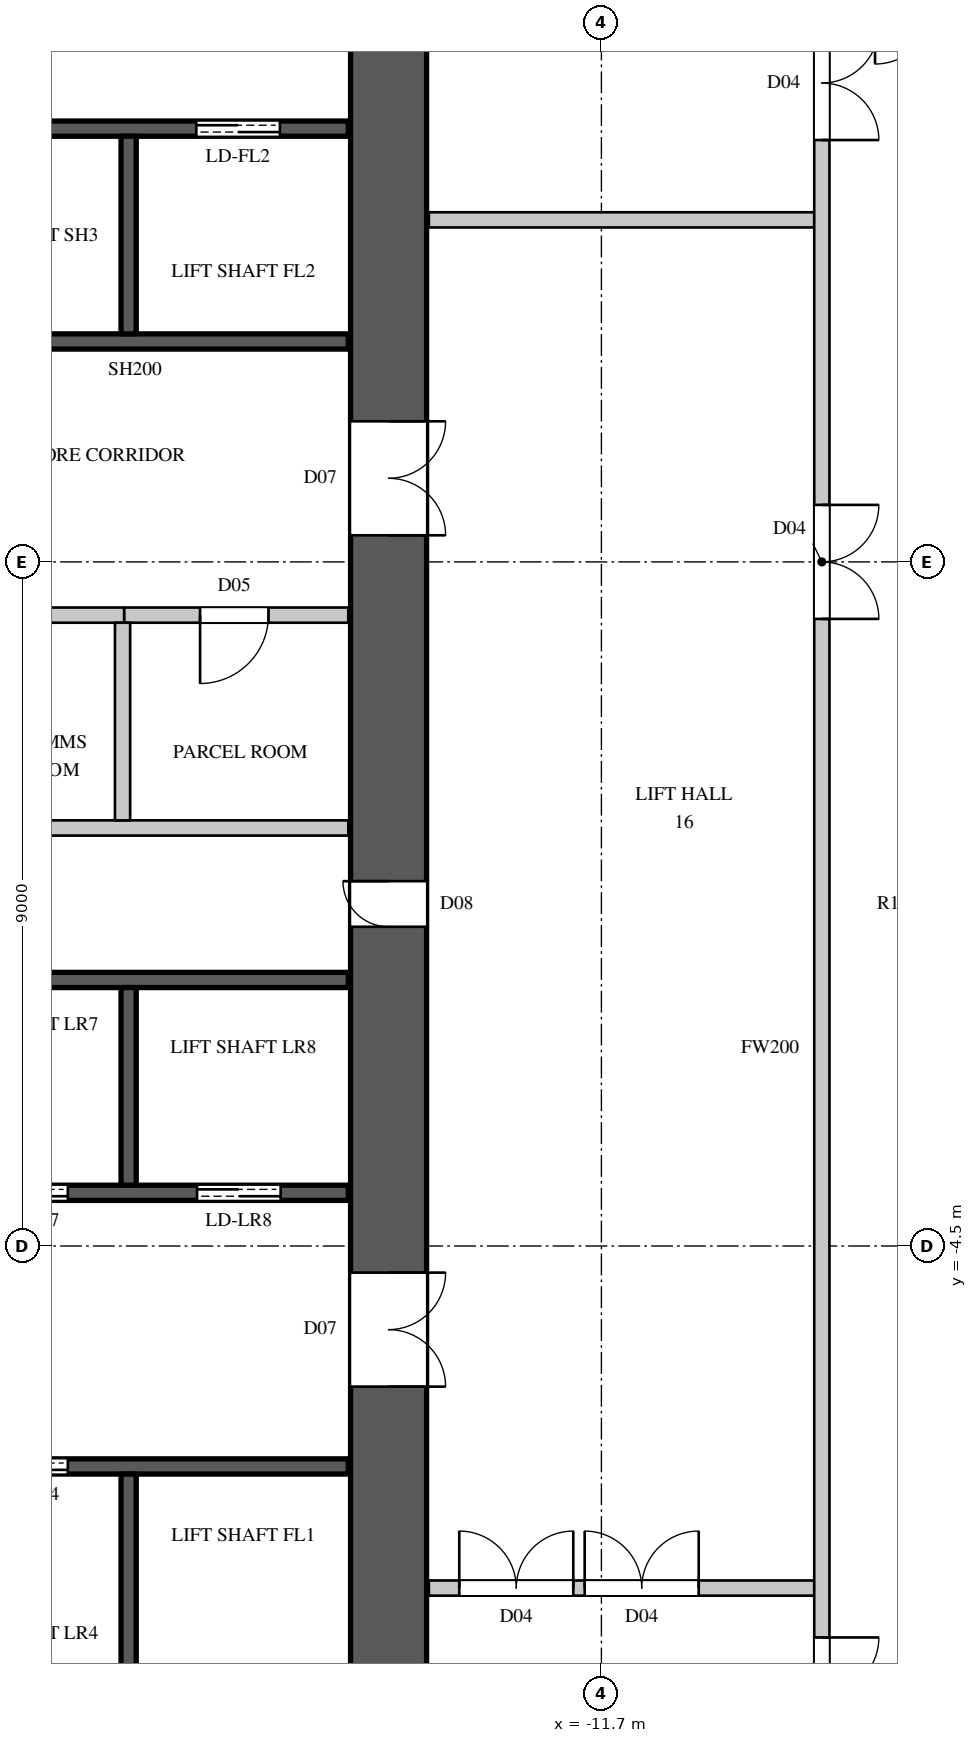
"""IFC4 building model, lengths in metres.
Left out: names, types, materials, properties, quantities, classifications, styles, units other than length and angle.
Written with IfcOpenShell. Run it as: python <this file> out.ifc"""

import sys

from ifc_helpers import new_model, si_unit, direction, frame, frame_2d, origin, place, context, subcontext, project, spatial, rectangle, extrude, element, fill, save


model = new_model("IFC4")
c1 = context("Model", 3, precision=1e-05, world=origin(), true_north=direction((0.0, 1.0)))
c2 = subcontext(c1, "Body", "Model", "MODEL_VIEW")
j1 = project(units=[si_unit("LENGTHUNIT", "METRE"), si_unit("PLANEANGLEUNIT", "RADIAN")], contexts=[c1])
p1 = place(None, origin())
s1 = spatial("IfcSite", under=j1, at=p1, CompositionType="ELEMENT")
p2 = place(p1, origin())
s2 = spatial("IfcBuilding", under=s1, at=p2, CompositionType="ELEMENT")
p3 = place(p2, frame((0.0, 0.0, 87.9)))
s3 = spatial("IfcBuildingStorey", under=s2, at=p3, CompositionType="ELEMENT", Elevation=87.9)
p4 = place(p3, frame((-14.5, -14.8, 0.0), z_axis=(0.0, 0.0, 1.0), x_axis=(0.0, 1.0, 0.0)))
e1 = element("IfcWall", 1, at=p4, inside=s3, PredefinedType="SHEAR", context=c2, shape_type="SweptSolid", body=[
    extrude(rectangle(XDim=29.6, YDim=1.0, at=frame_2d((14.8, 0.0))), origin(), (0.0, 0.0, 1.0), 3.6),
])
p5 = place(p4, frame((8.45, 0.0, 0.0)))
e2 = element("IfcOpeningElement", 2, at=p5, cuts=e1, PredefinedType="OPENING", context=c2, shape_type="SweptSolid", body=[
    extrude(rectangle(XDim=1.5, YDim=2.4, at=frame_2d((0.75, 1.2))), frame((0.0, 0.51, 0.0), z_axis=(0.0, -1.0, 0.0), x_axis=(1.0, 0.0, 0.0)), (0.0, 0.0, 1.0), 1.02),
])
p6 = place(p4, frame((19.65, 0.0, 0.0)))
e3 = element("IfcOpeningElement", 3, at=p6, cuts=e1, PredefinedType="OPENING", context=c2, shape_type="SweptSolid", body=[
    extrude(rectangle(XDim=1.5, YDim=2.4, at=frame_2d((0.75, 1.2))), frame((0.0, 0.51, 0.0), z_axis=(0.0, -1.0, 0.0), x_axis=(1.0, 0.0, 0.0)), (0.0, 0.0, 1.0), 1.02),
])
p7 = place(p4, frame((14.5, 0.0, 0.0)))
e4 = element("IfcOpeningElement", 4, at=p7, cuts=e1, PredefinedType="OPENING", context=c2, shape_type="SweptSolid", body=[
    extrude(rectangle(XDim=0.6, YDim=2.0, at=frame_2d((0.3, 1.0))), frame((0.0, 0.51, 0.0), z_axis=(0.0, -1.0, 0.0), x_axis=(1.0, 0.0, 0.0)), (0.0, 0.0, 1.0), 1.02),
])
p8 = place(p3, frame((-17.98, 3.8, 0.0), z_axis=(0.0, 0.0, 1.0), x_axis=(1.0, 0.0, 0.0)))
e5 = element("IfcWall", 5, at=p8, inside=s3, PredefinedType="PARTITIONING", context=c2, shape_type="SweptSolid", body=[
    extrude(rectangle(XDim=2.95, YDim=0.2, at=frame_2d((1.475, 0.0))), origin(), (0.0, 0.0, 1.0), 3.3),
])
p9 = place(p8, frame((1.0, 0.0, 0.0)))
e6 = element("IfcOpeningElement", 6, at=p9, cuts=e5, PredefinedType="OPENING", context=c2, shape_type="SweptSolid", body=[
    extrude(rectangle(XDim=0.9, YDim=2.2, at=frame_2d((0.45, 1.1))), frame((0.0, 0.11, 0.0), z_axis=(0.0, -1.0, 0.0), x_axis=(1.0, 0.0, 0.0)), (0.0, 0.0, 1.0), 0.22),
])
p10 = place(p3, frame((-13.97, -9.0, 0.0), z_axis=(0.0, 0.0, 1.0), x_axis=(1.0, 0.0, 0.0)))
e7 = element("IfcWall", 7, at=p10, inside=s3, PredefinedType="PARTITIONING", context=c2, shape_type="SweptSolid", body=[
    extrude(rectangle(XDim=5.07, YDim=0.2, at=frame_2d((2.535, 0.0))), origin(), (0.0, 0.0, 1.0), 3.3),
])
p11 = place(p10, frame((0.4, 0.0, 0.0)))
e8 = element("IfcOpeningElement", 8, at=p11, cuts=e7, PredefinedType="OPENING", context=c2, shape_type="SweptSolid", body=[
    extrude(rectangle(XDim=1.5, YDim=2.2, at=frame_2d((0.75, 1.1))), frame((0.0, 0.11, 0.0), z_axis=(0.0, -1.0, 0.0), x_axis=(1.0, 0.0, 0.0)), (0.0, 0.0, 1.0), 0.22),
])
p12 = place(p10, frame((2.05, 0.0, 0.0)))
e9 = element("IfcOpeningElement", 9, at=p12, cuts=e7, PredefinedType="OPENING", context=c2, shape_type="SweptSolid", body=[
    extrude(rectangle(XDim=1.5, YDim=2.2, at=frame_2d((0.75, 1.1))), frame((0.0, 0.11, 0.0), z_axis=(0.0, -1.0, 0.0), x_axis=(1.0, 0.0, 0.0)), (0.0, 0.0, 1.0), 0.22),
])
p13 = place(p3, frame((-13.97, 9.0, 0.0), z_axis=(0.0, 0.0, 1.0), x_axis=(1.0, 0.0, 0.0)))
e10 = element("IfcWall", 10, at=p13, inside=s3, PredefinedType="PARTITIONING", context=c2, shape_type="SweptSolid", body=[
    extrude(rectangle(XDim=5.07, YDim=0.2, at=frame_2d((2.535, 0.0))), origin(), (0.0, 0.0, 1.0), 3.3),
])
p14 = place(p3, frame((-8.8, -15.5, 0.0), z_axis=(0.0, 0.0, 1.0), x_axis=(0.0, 1.0, 0.0)))
e11 = element("IfcWall", 11, at=p14, inside=s3, PredefinedType="PARTITIONING", context=c2, shape_type="SweptSolid", body=[
    extrude(rectangle(XDim=27.2, YDim=0.2, at=frame_2d((13.6, 0.0))), origin(), (0.0, 0.0, 1.0), 3.3),
])
p15 = place(p14, frame((19.25, 0.0, 0.0)))
e12 = element("IfcOpeningElement", 12, at=p15, cuts=e11, PredefinedType="OPENING", context=c2, shape_type="SweptSolid", body=[
    extrude(rectangle(XDim=1.5, YDim=2.2, at=frame_2d((0.75, 1.1))), frame((0.0, 0.11, 0.0), z_axis=(0.0, -1.0, 0.0), x_axis=(1.0, 0.0, 0.0)), (0.0, 0.0, 1.0), 0.22),
])
p16 = place(p14, frame((4.35, 0.0, 0.0)))
e13 = element("IfcOpeningElement", 13, at=p16, cuts=e11, PredefinedType="OPENING", context=c2, shape_type="SweptSolid", body=[
    extrude(rectangle(XDim=1.5, YDim=2.2, at=frame_2d((0.75, 1.1))), frame((0.0, 0.11, 0.0), z_axis=(0.0, -1.0, 0.0), x_axis=(1.0, 0.0, 0.0)), (0.0, 0.0, 1.0), 0.22),
])
p17 = place(p14, frame((25.55, 0.0, 0.0)))
e14 = element("IfcOpeningElement", 14, at=p17, cuts=e11, PredefinedType="OPENING", context=c2, shape_type="SweptSolid", body=[
    extrude(rectangle(XDim=1.5, YDim=2.2, at=frame_2d((0.75, 1.1))), frame((0.0, 0.11, 0.0), z_axis=(0.0, -1.0, 0.0), x_axis=(1.0, 0.0, 0.0)), (0.0, 0.0, 1.0), 0.22),
])
p18 = place(p14, frame((0.15, 0.0, 0.0)))
e15 = element("IfcOpeningElement", 15, at=p18, cuts=e11, PredefinedType="OPENING", context=c2, shape_type="SweptSolid", body=[
    extrude(rectangle(XDim=0.9, YDim=2.2, at=frame_2d((0.45, 1.1))), frame((0.0, 0.11, 0.0), z_axis=(0.0, -1.0, 0.0), x_axis=(1.0, 0.0, 0.0)), (0.0, 0.0, 1.0), 0.22),
])
p19 = place(p3, frame((-26.1, 1.0, 0.0), z_axis=(0.0, 0.0, 1.0), x_axis=(1.0, 0.0, 0.0)))
e16 = element("IfcWall", 16, at=p19, inside=s3, PredefinedType="PARTITIONING", context=c2, shape_type="SweptSolid", body=[
    extrude(rectangle(XDim=11.07, YDim=0.2, at=frame_2d((5.535, 0.0))), origin(), (0.0, 0.0, 1.0), 3.3),
])
p20 = place(p3, frame((-21.78, 3.8, 0.0), z_axis=(0.0, 0.0, 1.0), x_axis=(1.0, 0.0, 0.0)))
e17 = element("IfcWall", 17, at=p20, inside=s3, PredefinedType="PARTITIONING", context=c2, shape_type="SweptSolid", body=[
    extrude(rectangle(XDim=3.8, YDim=0.2, at=frame_2d((1.9, 0.0))), origin(), (0.0, 0.0, 1.0), 3.3),
])
p21 = place(p20, frame((1.45, 0.0, 0.0)))
e18 = element("IfcOpeningElement", 18, at=p21, cuts=e17, PredefinedType="OPENING", context=c2, shape_type="SweptSolid", body=[
    extrude(rectangle(XDim=0.9, YDim=2.2, at=frame_2d((0.45, 1.1))), frame((0.0, 0.11, 0.0), z_axis=(0.0, -1.0, 0.0), x_axis=(1.0, 0.0, 0.0)), (0.0, 0.0, 1.0), 0.22),
])
p22 = place(p3, frame((-18.0, 1.1, 0.0), z_axis=(0.0, 0.0, 1.0), x_axis=(0.0, 1.0, 0.0)))
e19 = element("IfcWall", 19, at=p22, inside=s3, PredefinedType="PARTITIONING", context=c2, shape_type="SweptSolid", body=[
    extrude(rectangle(XDim=2.6, YDim=0.2, at=frame_2d((1.3, 0.0))), origin(), (0.0, 0.0, 1.0), 3.3),
])
p23 = place(p3, frame((-28.97, -7.4, 0.0), z_axis=(0.0, 0.0, 1.0), x_axis=(1.0, 0.0, 0.0)))
e20 = element("IfcWall", 20, at=p23, inside=s3, PredefinedType="SHEAR", context=c2, shape_type="SweptSolid", body=[
    extrude(rectangle(XDim=13.94, YDim=0.2, at=frame_2d((6.97, 0.0))), origin(), (0.0, 0.0, 1.0), 3.3),
])
p24 = place(p23, frame((0.9, 0.0, 0.0)))
e21 = element("IfcOpeningElement", 21, at=p24, cuts=e20, PredefinedType="OPENING", context=c2, shape_type="SweptSolid", body=[
    extrude(rectangle(XDim=1.1, YDim=2.2, at=frame_2d((0.55, 1.1))), frame((0.0, 0.11, 0.0), z_axis=(0.0, -1.0, 0.0), x_axis=(1.0, 0.0, 0.0)), (0.0, 0.0, 1.0), 0.22),
])
p25 = place(p23, frame((3.7, 0.0, 0.0)))
e22 = element("IfcOpeningElement", 22, at=p25, cuts=e20, PredefinedType="OPENING", context=c2, shape_type="SweptSolid", body=[
    extrude(rectangle(XDim=1.1, YDim=2.2, at=frame_2d((0.55, 1.1))), frame((0.0, 0.11, 0.0), z_axis=(0.0, -1.0, 0.0), x_axis=(1.0, 0.0, 0.0)), (0.0, 0.0, 1.0), 0.22),
])
p26 = place(p23, frame((6.4, 0.0, 0.0)))
e23 = element("IfcOpeningElement", 23, at=p26, cuts=e20, PredefinedType="OPENING", context=c2, shape_type="SweptSolid", body=[
    extrude(rectangle(XDim=1.1, YDim=2.2, at=frame_2d((0.55, 1.1))), frame((0.0, 0.11, 0.0), z_axis=(0.0, -1.0, 0.0), x_axis=(1.0, 0.0, 0.0)), (0.0, 0.0, 1.0), 0.22),
])
p27 = place(p23, frame((9.15, 0.0, 0.0)))
e24 = element("IfcOpeningElement", 24, at=p27, cuts=e20, PredefinedType="OPENING", context=c2, shape_type="SweptSolid", body=[
    extrude(rectangle(XDim=1.1, YDim=2.2, at=frame_2d((0.55, 1.1))), frame((0.0, 0.11, 0.0), z_axis=(0.0, -1.0, 0.0), x_axis=(1.0, 0.0, 0.0)), (0.0, 0.0, 1.0), 0.22),
])
p28 = place(p3, frame((-28.97, -3.8, 0.0), z_axis=(0.0, 0.0, 1.0), x_axis=(1.0, 0.0, 0.0)))
e25 = element("IfcWall", 25, at=p28, inside=s3, PredefinedType="SHEAR", context=c2, shape_type="SweptSolid", body=[
    extrude(rectangle(XDim=13.94, YDim=0.2, at=frame_2d((6.97, 0.0))), origin(), (0.0, 0.0, 1.0), 3.3),
])
p29 = place(p28, frame((3.7, 0.0, 0.0)))
e26 = element("IfcOpeningElement", 26, at=p29, cuts=e25, PredefinedType="OPENING", context=c2, shape_type="SweptSolid", body=[
    extrude(rectangle(XDim=1.1, YDim=2.2, at=frame_2d((0.55, 1.1))), frame((0.0, 0.11, 0.0), z_axis=(0.0, -1.0, 0.0), x_axis=(1.0, 0.0, 0.0)), (0.0, 0.0, 1.0), 0.22),
])
p30 = place(p28, frame((6.4, 0.0, 0.0)))
e27 = element("IfcOpeningElement", 27, at=p30, cuts=e25, PredefinedType="OPENING", context=c2, shape_type="SweptSolid", body=[
    extrude(rectangle(XDim=1.1, YDim=2.2, at=frame_2d((0.55, 1.1))), frame((0.0, 0.11, 0.0), z_axis=(0.0, -1.0, 0.0), x_axis=(1.0, 0.0, 0.0)), (0.0, 0.0, 1.0), 0.22),
])
p31 = place(p28, frame((9.15, 0.0, 0.0)))
e28 = element("IfcOpeningElement", 28, at=p31, cuts=e25, PredefinedType="OPENING", context=c2, shape_type="SweptSolid", body=[
    extrude(rectangle(XDim=1.1, YDim=2.2, at=frame_2d((0.55, 1.1))), frame((0.0, 0.11, 0.0), z_axis=(0.0, -1.0, 0.0), x_axis=(1.0, 0.0, 0.0)), (0.0, 0.0, 1.0), 0.22),
])
p32 = place(p28, frame((11.95, 0.0, 0.0)))
e29 = element("IfcOpeningElement", 29, at=p32, cuts=e25, PredefinedType="OPENING", context=c2, shape_type="SweptSolid", body=[
    extrude(rectangle(XDim=1.1, YDim=2.2, at=frame_2d((0.55, 1.1))), frame((0.0, 0.11, 0.0), z_axis=(0.0, -1.0, 0.0), x_axis=(1.0, 0.0, 0.0)), (0.0, 0.0, 1.0), 0.22),
])
p33 = place(p3, frame((-28.97, -1.0, 0.0), z_axis=(0.0, 0.0, 1.0), x_axis=(1.0, 0.0, 0.0)))
e30 = element("IfcWall", 30, at=p33, inside=s3, PredefinedType="SHEAR", context=c2, shape_type="SweptSolid", body=[
    extrude(rectangle(XDim=13.94, YDim=0.2, at=frame_2d((6.97, 0.0))), origin(), (0.0, 0.0, 1.0), 3.3),
])
p34 = place(p3, frame((-20.64, 7.4, 0.0), z_axis=(0.0, 0.0, 1.0), x_axis=(1.0, 0.0, 0.0)))
e31 = element("IfcWall", 31, at=p34, inside=s3, PredefinedType="SHEAR", context=c2, shape_type="SweptSolid", body=[
    extrude(rectangle(XDim=5.61, YDim=0.2, at=frame_2d((2.805, 0.0))), origin(), (0.0, 0.0, 1.0), 3.3),
])
p35 = place(p3, frame((-19.98, 10.2, 0.0), z_axis=(0.0, 0.0, 1.0), x_axis=(1.0, 0.0, 0.0)))
e32 = element("IfcWall", 32, at=p35, inside=s3, PredefinedType="SHEAR", context=c2, shape_type="SweptSolid", body=[
    extrude(rectangle(XDim=4.95, YDim=0.2, at=frame_2d((2.475, 0.0))), origin(), (0.0, 0.0, 1.0), 3.3),
])
p36 = place(p35, frame((2.95, 0.0, 0.0)))
e33 = element("IfcOpeningElement", 33, at=p36, cuts=e32, PredefinedType="OPENING", context=c2, shape_type="SweptSolid", body=[
    extrude(rectangle(XDim=1.1, YDim=2.2, at=frame_2d((0.55, 1.1))), frame((0.0, 0.11, 0.0), z_axis=(0.0, -1.0, 0.0), x_axis=(1.0, 0.0, 0.0)), (0.0, 0.0, 1.0), 0.22),
])
p37 = place(p3, frame((-17.92, -10.1, 0.0), z_axis=(0.0, 0.0, 1.0), x_axis=(0.0, 1.0, 0.0)))
e34 = element("IfcWall", 34, at=p37, inside=s3, PredefinedType="SHEAR", context=c2, shape_type="SweptSolid", body=[
    extrude(rectangle(XDim=2.6, YDim=0.2, at=frame_2d((1.3, 0.0))), origin(), (0.0, 0.0, 1.0), 3.6),
])
p38 = place(p3, frame((-17.92, -3.7, 0.0), z_axis=(0.0, 0.0, 1.0), x_axis=(0.0, 1.0, 0.0)))
e35 = element("IfcWall", 35, at=p38, inside=s3, PredefinedType="SHEAR", context=c2, shape_type="SweptSolid", body=[
    extrude(rectangle(XDim=2.6, YDim=0.2, at=frame_2d((1.3, 0.0))), origin(), (0.0, 0.0, 1.0), 3.6),
])
p39 = place(p3, frame((-17.92, 7.5, 0.0), z_axis=(0.0, 0.0, 1.0), x_axis=(0.0, 1.0, 0.0)))
e36 = element("IfcWall", 36, at=p39, inside=s3, PredefinedType="SHEAR", context=c2, shape_type="SweptSolid", body=[
    extrude(rectangle(XDim=2.6, YDim=0.2, at=frame_2d((1.3, 0.0))), origin(), (0.0, 0.0, 1.0), 3.6),
])
p40 = place(p9, origin())
e37 = element("IfcDoor", 37, at=p40, inside=s3, OperationType="SINGLE_SWING_RIGHT", PredefinedType="DOOR", context=c2, shape_type="SweptSolid", body=[
    extrude(rectangle(XDim=0.9, YDim=2.2, at=frame_2d((0.45, 1.1))), frame((0.0, 0.025, 0.0), z_axis=(0.0, -1.0, 0.0), x_axis=(1.0, 0.0, 0.0)), (0.0, 0.0, 1.0), 0.05),
])
fill(e6, e37)
p41 = place(p27, origin())
e38 = element("IfcDoor", 38, at=p41, inside=s3, OperationType="DOUBLE_DOOR_SLIDING", PredefinedType="DOOR", context=c2, shape_type="SweptSolid", body=[
    extrude(rectangle(XDim=1.1, YDim=2.2, at=frame_2d((0.55, 1.1))), frame((0.0, 0.025, 0.0), z_axis=(0.0, -1.0, 0.0), x_axis=(1.0, 0.0, 0.0)), (0.0, 0.0, 1.0), 0.05),
])
fill(e24, e38)
p42 = place(p31, origin())
e39 = element("IfcDoor", 39, at=p42, inside=s3, OperationType="DOUBLE_DOOR_SLIDING", PredefinedType="DOOR", context=c2, shape_type="SweptSolid", body=[
    extrude(rectangle(XDim=1.1, YDim=2.2, at=frame_2d((0.55, 1.1))), frame((0.0, 0.025, 0.0), z_axis=(0.0, -1.0, 0.0), x_axis=(1.0, 0.0, 0.0)), (0.0, 0.0, 1.0), 0.05),
])
fill(e28, e39)
p43 = place(p32, origin())
e40 = element("IfcDoor", 40, at=p43, inside=s3, OperationType="DOUBLE_DOOR_SLIDING", PredefinedType="DOOR", context=c2, shape_type="SweptSolid", body=[
    extrude(rectangle(XDim=1.1, YDim=2.2, at=frame_2d((0.55, 1.1))), frame((0.0, 0.025, 0.0), z_axis=(0.0, -1.0, 0.0), x_axis=(1.0, 0.0, 0.0)), (0.0, 0.0, 1.0), 0.05),
])
fill(e29, e40)
p44 = place(p36, origin())
e41 = element("IfcDoor", 41, at=p44, inside=s3, OperationType="DOUBLE_DOOR_SLIDING", PredefinedType="DOOR", context=c2, shape_type="SweptSolid", body=[
    extrude(rectangle(XDim=1.1, YDim=2.2, at=frame_2d((0.55, 1.1))), frame((0.0, 0.025, 0.0), z_axis=(0.0, -1.0, 0.0), x_axis=(1.0, 0.0, 0.0)), (0.0, 0.0, 1.0), 0.05),
])
fill(e33, e41)
p45 = place(p15, origin())
e42 = element("IfcDoor", 42, at=p45, inside=s3, OperationType="DOUBLE_DOOR_SINGLE_SWING", PredefinedType="DOOR", context=c2, shape_type="SweptSolid", body=[
    extrude(rectangle(XDim=1.5, YDim=2.2, at=frame_2d((0.75, 1.1))), frame((0.0, 0.025, 0.0), z_axis=(0.0, -1.0, 0.0), x_axis=(1.0, 0.0, 0.0)), (0.0, 0.0, 1.0), 0.05),
])
fill(e12, e42)
p46 = place(p11, origin())
e43 = element("IfcDoor", 43, at=p46, inside=s3, OperationType="DOUBLE_DOOR_SINGLE_SWING", PredefinedType="DOOR", context=c2, shape_type="SweptSolid", body=[
    extrude(rectangle(XDim=1.5, YDim=2.2, at=frame_2d((0.75, 1.1))), frame((0.0, 0.025, 0.0), z_axis=(0.0, -1.0, 0.0), x_axis=(1.0, 0.0, 0.0)), (0.0, 0.0, 1.0), 0.05),
])
fill(e8, e43)
p47 = place(p12, origin())
e44 = element("IfcDoor", 44, at=p47, inside=s3, OperationType="DOUBLE_DOOR_SINGLE_SWING", PredefinedType="DOOR", context=c2, shape_type="SweptSolid", body=[
    extrude(rectangle(XDim=1.5, YDim=2.2, at=frame_2d((0.75, 1.1))), frame((0.0, 0.025, 0.0), z_axis=(0.0, -1.0, 0.0), x_axis=(1.0, 0.0, 0.0)), (0.0, 0.0, 1.0), 0.05),
])
fill(e9, e44)
p48 = place(p16, origin())
e45 = element("IfcDoor", 45, at=p48, inside=s3, OperationType="DOUBLE_DOOR_SINGLE_SWING", PredefinedType="DOOR", context=c2, shape_type="SweptSolid", body=[
    extrude(rectangle(XDim=1.5, YDim=2.2, at=frame_2d((0.75, 1.1))), frame((0.0, 0.025, 0.0), z_axis=(0.0, -1.0, 0.0), x_axis=(1.0, 0.0, 0.0)), (0.0, 0.0, 1.0), 0.05),
])
fill(e13, e45)
p49 = place(p17, origin())
e46 = element("IfcDoor", 46, at=p49, inside=s3, OperationType="DOUBLE_DOOR_SINGLE_SWING", PredefinedType="DOOR", context=c2, shape_type="SweptSolid", body=[
    extrude(rectangle(XDim=1.5, YDim=2.2, at=frame_2d((0.75, 1.1))), frame((0.0, 0.025, 0.0), z_axis=(0.0, -1.0, 0.0), x_axis=(1.0, 0.0, 0.0)), (0.0, 0.0, 1.0), 0.05),
])
fill(e14, e46)
p50 = place(p5, origin())
e47 = element("IfcDoor", 47, at=p50, inside=s3, OperationType="DOUBLE_DOOR_SINGLE_SWING", PredefinedType="DOOR", context=c2, shape_type="SweptSolid", body=[
    extrude(rectangle(XDim=1.5, YDim=2.4, at=frame_2d((0.75, 1.2))), frame((0.0, -0.445, 0.0), z_axis=(0.0, -1.0, 0.0), x_axis=(1.0, 0.0, 0.0)), (0.0, 0.0, 1.0), 0.05),
])
fill(e2, e47)
p51 = place(p6, origin())
e48 = element("IfcDoor", 48, at=p51, inside=s3, OperationType="DOUBLE_DOOR_SINGLE_SWING", PredefinedType="DOOR", context=c2, shape_type="SweptSolid", body=[
    extrude(rectangle(XDim=1.5, YDim=2.4, at=frame_2d((0.75, 1.2))), frame((0.0, -0.445, 0.0), z_axis=(0.0, -1.0, 0.0), x_axis=(1.0, 0.0, 0.0)), (0.0, 0.0, 1.0), 0.05),
])
fill(e3, e48)
p52 = place(p7, origin())
e49 = element("IfcDoor", 49, at=p52, inside=s3, OperationType="SINGLE_SWING_RIGHT", PredefinedType="DOOR", context=c2, shape_type="SweptSolid", body=[
    extrude(rectangle(XDim=0.6, YDim=2.0, at=frame_2d((0.3, 1.0))), frame((0.0, 0.495, 0.0), z_axis=(0.0, -1.0, 0.0), x_axis=(1.0, 0.0, 0.0)), (0.0, 0.0, 1.0), 0.05),
])
fill(e4, e49)
save(model, sys.argv[1])
